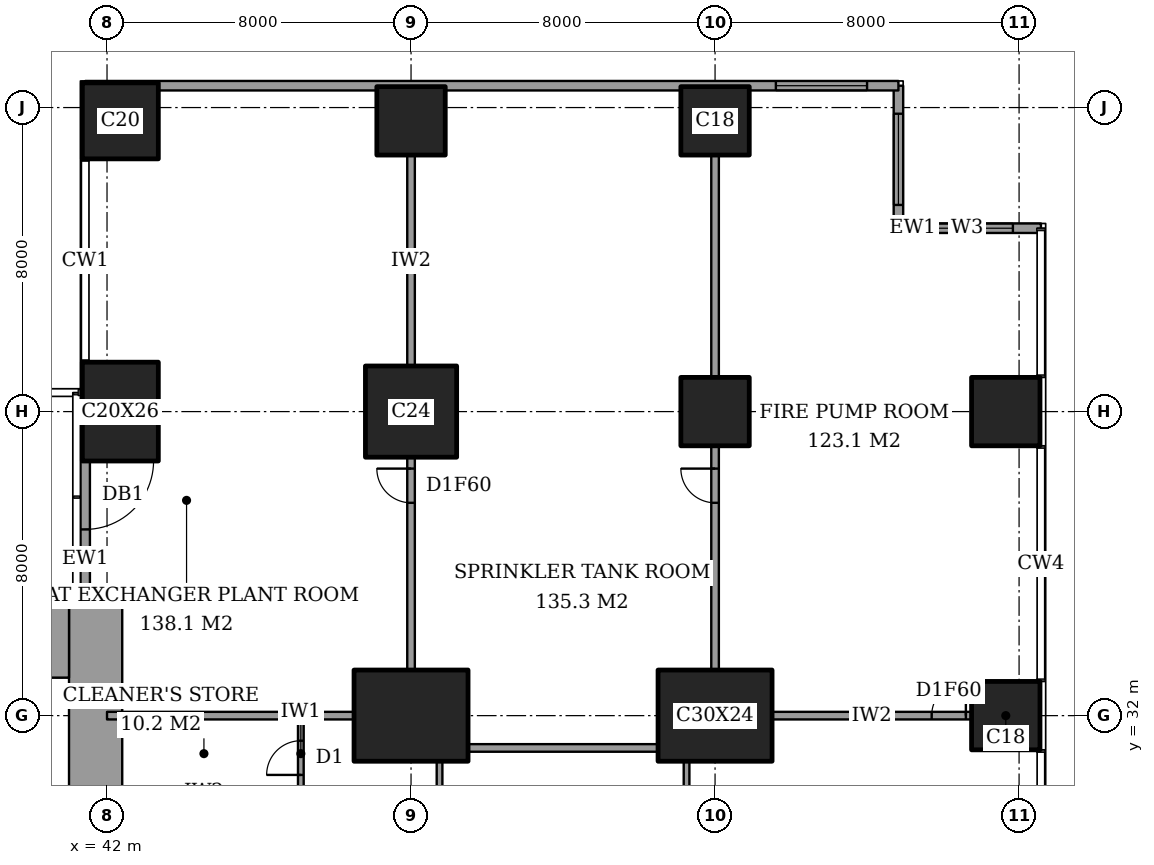
"""IFC4 building model, lengths in metres.
Left out: names, types, materials, properties, quantities, classifications, styles, units other than length and angle.
Written with IfcOpenShell. Run it as: python <this file> out.ifc"""

import sys

from ifc_helpers import new_model, si_unit, direction, frame, frame_2d, origin, origin_2d, place, context, subcontext, project, spatial, rectangle, extrude, element, fill, save


model = new_model("IFC4")
c1 = context("Model", 3, precision=1e-05, world=origin(), true_north=direction((0.0, 1.0)))
c2 = subcontext(c1, "Body", "Model", "MODEL_VIEW")
j1 = project(units=[si_unit("LENGTHUNIT", "METRE"), si_unit("PLANEANGLEUNIT", "RADIAN")], contexts=[c1])
p1 = place(None, origin())
s1 = spatial("IfcSite", under=j1, at=p1, CompositionType="ELEMENT")
p2 = place(p1, origin())
s2 = spatial("IfcBuilding", under=s1, at=p2, CompositionType="ELEMENT")
p3 = place(p2, frame((0.0, 0.0, 177.2)))
s3 = spatial("IfcBuildingStorey", under=s2, at=p3, CompositionType="ELEMENT", Elevation=177.2)
p4 = place(p3, frame((42.35, 40.0, 0.0), z_axis=(0.0, 0.0, 1.0), x_axis=(1.0, 0.0, 0.0)))
e1 = element("IfcColumn", 1, at=p4, inside=s3, PredefinedType="COLUMN", context=c2, shape_type="SweptSolid", body=[
    extrude(rectangle(XDim=2.0, YDim=2.6, at=origin_2d()), origin(), (0.0, 0.0, 1.0), 5.0),
])
p5 = place(p3, frame((42.35, 47.65, 0.0), z_axis=(0.0, 0.0, 1.0), x_axis=(1.0, 0.0, 0.0)))
e2 = element("IfcColumn", 2, at=p5, inside=s3, PredefinedType="COLUMN", context=c2, shape_type="SweptSolid", body=[
    extrude(rectangle(XDim=2.0, YDim=2.0, at=origin_2d()), origin(), (0.0, 0.0, 1.0), 5.0),
])
p6 = place(p3, frame((50.0, 32.0, 0.0), z_axis=(0.0, 0.0, 1.0), x_axis=(1.0, 0.0, 0.0)))
e3 = element("IfcColumn", 3, at=p6, inside=s3, PredefinedType="COLUMN", context=c2, shape_type="SweptSolid", body=[
    extrude(rectangle(XDim=3.0, YDim=2.4, at=origin_2d()), origin(), (0.0, 0.0, 1.0), 5.0),
])
p7 = place(p3, frame((50.0, 40.0, 0.0), z_axis=(0.0, 0.0, 1.0), x_axis=(1.0, 0.0, 0.0)))
e4 = element("IfcColumn", 4, at=p7, inside=s3, PredefinedType="COLUMN", context=c2, shape_type="SweptSolid", body=[
    extrude(rectangle(XDim=2.4, YDim=2.4, at=origin_2d()), origin(), (0.0, 0.0, 1.0), 5.0),
])
p8 = place(p3, frame((50.0, 47.65, 0.0), z_axis=(0.0, 0.0, 1.0), x_axis=(1.0, 0.0, 0.0)))
e5 = element("IfcColumn", 5, at=p8, inside=s3, PredefinedType="COLUMN", context=c2, shape_type="SweptSolid", body=[
    extrude(rectangle(XDim=1.8, YDim=1.8, at=origin_2d()), origin(), (0.0, 0.0, 1.0), 5.0),
])
p9 = place(p3, frame((58.0, 32.0, 0.0), z_axis=(0.0, 0.0, 1.0), x_axis=(1.0, 0.0, 0.0)))
e6 = element("IfcColumn", 6, at=p9, inside=s3, PredefinedType="COLUMN", context=c2, shape_type="SweptSolid", body=[
    extrude(rectangle(XDim=3.0, YDim=2.4, at=origin_2d()), origin(), (0.0, 0.0, 1.0), 5.0),
])
for number, where, z_axis, x_axis in (
    (7, (58.0, 40.0, 0.0), (0.0, 0.0, 1.0), (1.0, 0.0, 0.0)),
    (8, (58.0, 47.65, 0.0), (0.0, 0.0, 1.0), (1.0, 0.0, 0.0)),
    (9, (65.65, 32.0, 0.0), (0.0, 0.0, 1.0), (1.0, 0.0, 0.0)),
    (10, (65.65, 40.0, 0.0), (0.0, 0.0, 1.0), (1.0, 0.0, 0.0)),
):
    element("IfcColumn", number, at=place(p3, frame(where, z_axis=z_axis, x_axis=x_axis)), inside=s3, PredefinedType="COLUMN", context=c2, shape_type="SweptSolid", body=[
        extrude(rectangle(XDim=1.8, YDim=1.8, at=origin_2d()), origin(), (0.0, 0.0, 1.0), 5.0),
    ])
p10 = place(p3, frame((37.85, 34.0, 0.0), z_axis=(0.0, 0.0, 1.0), x_axis=(1.0, 0.0, 0.0)))
e11 = element("IfcWall", 11, at=p10, inside=s3, PredefinedType="SHEAR", context=c2, shape_type="SweptSolid", body=[
    extrude(rectangle(XDim=3.15, YDim=2.0, at=frame_2d((1.575, 0.0))), origin(), (0.0, 0.0, 1.0), 5.0),
])
p11 = place(p3, frame((41.7, 24.85, 0.0), z_axis=(0.0, 0.0, 1.0), x_axis=(0.0, 1.0, 0.0)))
e12 = element("IfcWall", 12, at=p11, inside=s3, PredefinedType="SHEAR", context=c2, shape_type="SweptSolid", body=[
    extrude(rectangle(XDim=10.15, YDim=1.4, at=frame_2d((5.075, 0.0))), origin(), (0.0, 0.0, 1.0), 5.0),
])
p12 = place(p3, frame((66.575, 44.825, 0.0), z_axis=(0.0, 0.0, 1.0), x_axis=(-1.0, 0.0, 0.0)))
e13 = element("IfcWall", 13, at=p12, inside=s3, PredefinedType="SOLIDWALL", context=c2, shape_type="SweptSolid", body=[
    extrude(rectangle(XDim=3.75, YDim=0.25, at=frame_2d((1.875, 0.0))), origin(), (0.0, 0.0, 1.0), 5.0),
])
p13 = place(p12, frame((0.738, 0.0, 0.6)))
e14 = element("IfcOpeningElement", 14, at=p13, cuts=e13, PredefinedType="OPENING", context=c2, shape_type="SweptSolid", body=[
    extrude(rectangle(XDim=2.4, YDim=3.0, at=frame_2d((1.2, 1.5))), frame((0.0, 0.135, 0.0), z_axis=(0.0, -1.0, 0.0), x_axis=(1.0, 0.0, 0.0)), (0.0, 0.0, 1.0), 0.27),
])
p14 = place(p3, frame((62.825, 44.825, 0.0), z_axis=(0.0, 0.0, 1.0), x_axis=(0.0, 1.0, 0.0)))
e15 = element("IfcWall", 15, at=p14, inside=s3, PredefinedType="SOLIDWALL", context=c2, shape_type="SweptSolid", body=[
    extrude(rectangle(XDim=3.75, YDim=0.25, at=frame_2d((1.875, 0.0))), origin(), (0.0, 0.0, 1.0), 5.0),
])
p15 = place(p14, frame((0.613, 0.0, 0.6)))
e16 = element("IfcOpeningElement", 16, at=p15, cuts=e15, PredefinedType="OPENING", context=c2, shape_type="SweptSolid", body=[
    extrude(rectangle(XDim=2.4, YDim=3.0, at=frame_2d((1.2, 1.5))), frame((0.0, 0.135, 0.0), z_axis=(0.0, -1.0, 0.0), x_axis=(1.0, 0.0, 0.0)), (0.0, 0.0, 1.0), 0.27),
])
p16 = place(p3, frame((62.825, 48.575, 0.0), z_axis=(0.0, 0.0, 1.0), x_axis=(-1.0, 0.0, 0.0)))
e17 = element("IfcWall", 17, at=p16, inside=s3, PredefinedType="SOLIDWALL", context=c2, shape_type="SweptSolid", body=[
    extrude(rectangle(XDim=21.4, YDim=0.25, at=frame_2d((10.7, 0.0))), origin(), (0.0, 0.0, 1.0), 5.0),
])
p17 = place(p16, frame((0.825, 0.0, 0.6)))
e18 = element("IfcOpeningElement", 18, at=p17, cuts=e17, PredefinedType="OPENING", context=c2, shape_type="SweptSolid", body=[
    extrude(rectangle(XDim=2.4, YDim=3.0, at=frame_2d((1.2, 1.5))), frame((0.0, 0.135, 0.0), z_axis=(0.0, -1.0, 0.0), x_axis=(1.0, 0.0, 0.0)), (0.0, 0.0, 1.0), 0.27),
])
p18 = place(p3, frame((41.425, 40.6, 0.0), z_axis=(0.0, 0.0, 1.0), x_axis=(0.0, -1.0, 0.0)))
e19 = element("IfcWall", 19, at=p18, inside=s3, PredefinedType="SOLIDWALL", context=c2, shape_type="SweptSolid", body=[
    extrude(rectangle(XDim=5.6, YDim=0.25, at=frame_2d((2.8, 0.0))), origin(), (0.0, 0.0, 1.0), 5.0),
])
p19 = place(p18, frame((1.9, 0.0, 0.0)))
e20 = element("IfcOpeningElement", 20, at=p19, cuts=e19, PredefinedType="OPENING", context=c2, shape_type="SweptSolid", body=[
    extrude(rectangle(XDim=1.8, YDim=2.4, at=frame_2d((0.9, 1.2))), frame((0.0, 0.135, 0.0), z_axis=(0.0, -1.0, 0.0), x_axis=(1.0, 0.0, 0.0)), (0.0, 0.0, 1.0), 0.27),
])
p20 = place(p3, frame((51.5, 31.15, 0.0), z_axis=(0.0, 0.0, 1.0), x_axis=(1.0, 0.0, 0.0)))
e21 = element("IfcWall", 21, at=p20, inside=s3, PredefinedType="PARTITIONING", context=c2, shape_type="SweptSolid", body=[
    extrude(rectangle(XDim=5.0, YDim=0.2, at=frame_2d((2.5, 0.0))), origin(), (0.0, 0.0, 1.0), 4.75),
])
p21 = place(p3, frame((42.0, 32.0, 0.0), z_axis=(0.0, 0.0, 1.0), x_axis=(1.0, 0.0, 0.0)))
e22 = element("IfcWall", 22, at=p21, inside=s3, PredefinedType="PARTITIONING", context=c2, shape_type="SweptSolid", body=[
    extrude(rectangle(XDim=6.5, YDim=0.2, at=frame_2d((3.25, 0.0))), origin(), (0.0, 0.0, 1.0), 4.75),
])
p22 = place(p3, frame((59.5, 32.0, 0.0), z_axis=(0.0, 0.0, 1.0), x_axis=(1.0, 0.0, 0.0)))
e23 = element("IfcWall", 23, at=p22, inside=s3, PredefinedType="PARTITIONING", context=c2, shape_type="SweptSolid", body=[
    extrude(rectangle(XDim=5.25, YDim=0.2, at=frame_2d((2.625, 0.0))), origin(), (0.0, 0.0, 1.0), 4.75),
])
p23 = place(p22, frame((4.2, 0.0, 0.0)))
e24 = element("IfcOpeningElement", 24, at=p23, cuts=e23, PredefinedType="OPENING", context=c2, shape_type="SweptSolid", body=[
    extrude(rectangle(XDim=0.9, YDim=2.1, at=frame_2d((0.45, 1.05))), frame((0.0, 0.11, 0.0), z_axis=(0.0, -1.0, 0.0), x_axis=(1.0, 0.0, 0.0)), (0.0, 0.0, 1.0), 0.22),
])
p24 = place(p3, frame((47.1, 30.0, 0.0), z_axis=(0.0, 0.0, 1.0), x_axis=(0.0, 1.0, 0.0)))
e25 = element("IfcWall", 25, at=p24, inside=s3, PredefinedType="PARTITIONING", context=c2, shape_type="SweptSolid", body=[
    extrude(rectangle(XDim=2.0, YDim=0.15, at=frame_2d((1.0, 0.0))), origin(), (0.0, 0.0, 1.0), 4.75),
])
p25 = place(p24, frame((0.44, 0.0, 0.0)))
e26 = element("IfcOpeningElement", 26, at=p25, cuts=e25, PredefinedType="OPENING", context=c2, shape_type="SweptSolid", body=[
    extrude(rectangle(XDim=0.9, YDim=2.1, at=frame_2d((0.45, 1.05))), frame((0.0, 0.085, 0.0), z_axis=(0.0, -1.0, 0.0), x_axis=(1.0, 0.0, 0.0)), (0.0, 0.0, 1.0), 0.17),
])
p26 = place(p3, frame((50.0, 33.2, 0.0), z_axis=(0.0, 0.0, 1.0), x_axis=(0.0, 1.0, 0.0)))
e27 = element("IfcWall", 27, at=p26, inside=s3, PredefinedType="PARTITIONING", context=c2, shape_type="SweptSolid", body=[
    extrude(rectangle(XDim=5.6, YDim=0.2, at=frame_2d((2.8, 0.0))), origin(), (0.0, 0.0, 1.0), 4.75),
])
p27 = place(p26, frame((4.4, 0.0, 0.0)))
e28 = element("IfcOpeningElement", 28, at=p27, cuts=e27, PredefinedType="OPENING", context=c2, shape_type="SweptSolid", body=[
    extrude(rectangle(XDim=0.9, YDim=2.1, at=frame_2d((0.45, 1.05))), frame((0.0, 0.11, 0.0), z_axis=(0.0, -1.0, 0.0), x_axis=(1.0, 0.0, 0.0)), (0.0, 0.0, 1.0), 0.22),
])
p28 = place(p3, frame((50.0, 41.2, 0.0), z_axis=(0.0, 0.0, 1.0), x_axis=(0.0, 1.0, 0.0)))
e29 = element("IfcWall", 29, at=p28, inside=s3, PredefinedType="PARTITIONING", context=c2, shape_type="SweptSolid", body=[
    extrude(rectangle(XDim=5.55, YDim=0.2, at=frame_2d((2.775, 0.0))), origin(), (0.0, 0.0, 1.0), 4.75),
])
p29 = place(p3, frame((50.75, 24.9, 0.0), z_axis=(0.0, 0.0, 1.0), x_axis=(0.0, 1.0, 0.0)))
e30 = element("IfcWall", 30, at=p29, inside=s3, PredefinedType="PARTITIONING", context=c2, shape_type="SweptSolid", body=[
    extrude(rectangle(XDim=5.9, YDim=0.15, at=frame_2d((2.95, 0.0))), origin(), (0.0, 0.0, 1.0), 4.75),
])
p30 = place(p29, frame((0.86, 0.0, 0.0)))
e31 = element("IfcOpeningElement", 31, at=p30, cuts=e30, PredefinedType="OPENING", context=c2, shape_type="SweptSolid", body=[
    extrude(rectangle(XDim=0.9, YDim=2.1, at=frame_2d((0.45, 1.05))), frame((0.0, 0.085, 0.0), z_axis=(0.0, -1.0, 0.0), x_axis=(1.0, 0.0, 0.0)), (0.0, 0.0, 1.0), 0.17),
])
p31 = place(p3, frame((57.25, 24.9, 0.0), z_axis=(0.0, 0.0, 1.0), x_axis=(0.0, 1.0, 0.0)))
e32 = element("IfcWall", 32, at=p31, inside=s3, PredefinedType="PARTITIONING", context=c2, shape_type="SweptSolid", body=[
    extrude(rectangle(XDim=5.9, YDim=0.15, at=frame_2d((2.95, 0.0))), origin(), (0.0, 0.0, 1.0), 4.75),
])
p32 = place(p3, frame((58.0, 33.2, 0.0), z_axis=(0.0, 0.0, 1.0), x_axis=(0.0, 1.0, 0.0)))
e33 = element("IfcWall", 33, at=p32, inside=s3, PredefinedType="PARTITIONING", context=c2, shape_type="SweptSolid", body=[
    extrude(rectangle(XDim=5.9, YDim=0.2, at=frame_2d((2.95, 0.0))), origin(), (0.0, 0.0, 1.0), 4.75),
])
p33 = place(p32, frame((4.4, 0.0, 0.0)))
e34 = element("IfcOpeningElement", 34, at=p33, cuts=e33, PredefinedType="OPENING", context=c2, shape_type="SweptSolid", body=[
    extrude(rectangle(XDim=0.9, YDim=2.1, at=frame_2d((0.45, 1.05))), frame((0.0, 0.11, 0.0), z_axis=(0.0, -1.0, 0.0), x_axis=(1.0, 0.0, 0.0)), (0.0, 0.0, 1.0), 0.22),
])
p34 = place(p3, frame((58.0, 40.9, 0.0), z_axis=(0.0, 0.0, 1.0), x_axis=(0.0, 1.0, 0.0)))
e35 = element("IfcWall", 35, at=p34, inside=s3, PredefinedType="PARTITIONING", context=c2, shape_type="SweptSolid", body=[
    extrude(rectangle(XDim=5.85, YDim=0.2, at=frame_2d((2.925, 0.0))), origin(), (0.0, 0.0, 1.0), 4.75),
])
p35 = place(p13, origin())
e36 = element("IfcWindow", 36, at=p35, inside=s3, PartitioningType="SINGLE_PANEL", PredefinedType="WINDOW", context=c2, shape_type="SweptSolid", body=[
    extrude(rectangle(XDim=2.4, YDim=3.0, at=frame_2d((1.2, 1.5))), frame((0.0, 0.03, 0.0), z_axis=(0.0, -1.0, 0.0), x_axis=(1.0, 0.0, 0.0)), (0.0, 0.0, 1.0), 0.06),
])
fill(e14, e36)
p36 = place(p15, origin())
e37 = element("IfcWindow", 37, at=p36, inside=s3, PartitioningType="SINGLE_PANEL", PredefinedType="WINDOW", context=c2, shape_type="SweptSolid", body=[
    extrude(rectangle(XDim=2.4, YDim=3.0, at=frame_2d((1.2, 1.5))), frame((0.0, 0.03, 0.0), z_axis=(0.0, -1.0, 0.0), x_axis=(1.0, 0.0, 0.0)), (0.0, 0.0, 1.0), 0.06),
])
fill(e16, e37)
p37 = place(p17, origin())
e38 = element("IfcWindow", 38, at=p37, inside=s3, PartitioningType="SINGLE_PANEL", PredefinedType="WINDOW", context=c2, shape_type="SweptSolid", body=[
    extrude(rectangle(XDim=2.4, YDim=3.0, at=frame_2d((1.2, 1.5))), frame((0.0, 0.03, 0.0), z_axis=(0.0, -1.0, 0.0), x_axis=(1.0, 0.0, 0.0)), (0.0, 0.0, 1.0), 0.06),
])
fill(e18, e38)
p38 = place(p19, origin())
e39 = element("IfcDoor", 39, at=p38, inside=s3, OperationType="DOUBLE_DOOR_DOUBLE_SWING", PredefinedType="DOOR", context=c2, shape_type="SweptSolid", body=[
    extrude(rectangle(XDim=1.8, YDim=2.4, at=frame_2d((0.9, 1.2))), frame((0.0, 0.025, 0.0), z_axis=(0.0, -1.0, 0.0), x_axis=(1.0, 0.0, 0.0)), (0.0, 0.0, 1.0), 0.05),
])
fill(e20, e39)
p39 = place(p25, origin())
e40 = element("IfcDoor", 40, at=p39, inside=s3, OperationType="SINGLE_SWING_RIGHT", PredefinedType="DOOR", context=c2, shape_type="SweptSolid", body=[
    extrude(rectangle(XDim=0.9, YDim=2.1, at=frame_2d((0.45, 1.05))), frame((0.0, 0.025, 0.0), z_axis=(0.0, -1.0, 0.0), x_axis=(1.0, 0.0, 0.0)), (0.0, 0.0, 1.0), 0.05),
])
fill(e26, e40)
p40 = place(p23, origin())
e41 = element("IfcDoor", 41, at=p40, inside=s3, OperationType="SINGLE_SWING_LEFT", PredefinedType="DOOR", context=c2, shape_type="SweptSolid", body=[
    extrude(rectangle(XDim=0.9, YDim=2.1, at=frame_2d((0.45, 1.05))), frame((0.0, 0.025, 0.0), z_axis=(0.0, -1.0, 0.0), x_axis=(1.0, 0.0, 0.0)), (0.0, 0.0, 1.0), 0.05),
])
fill(e24, e41)
p41 = place(p33, origin())
e42 = element("IfcDoor", 42, at=p41, inside=s3, OperationType="SINGLE_SWING_LEFT", PredefinedType="DOOR", context=c2, shape_type="SweptSolid", body=[
    extrude(rectangle(XDim=0.9, YDim=2.1, at=frame_2d((0.45, 1.05))), frame((0.0, 0.025, 0.0), z_axis=(0.0, -1.0, 0.0), x_axis=(1.0, 0.0, 0.0)), (0.0, 0.0, 1.0), 0.05),
])
fill(e34, e42)
p42 = place(p27, origin())
e43 = element("IfcDoor", 43, at=p42, inside=s3, OperationType="SINGLE_SWING_LEFT", PredefinedType="DOOR", context=c2, shape_type="SweptSolid", body=[
    extrude(rectangle(XDim=0.9, YDim=2.1, at=frame_2d((0.45, 1.05))), frame((0.0, 0.025, 0.0), z_axis=(0.0, -1.0, 0.0), x_axis=(1.0, 0.0, 0.0)), (0.0, 0.0, 1.0), 0.05),
])
fill(e28, e43)
save(model, sys.argv[1])
